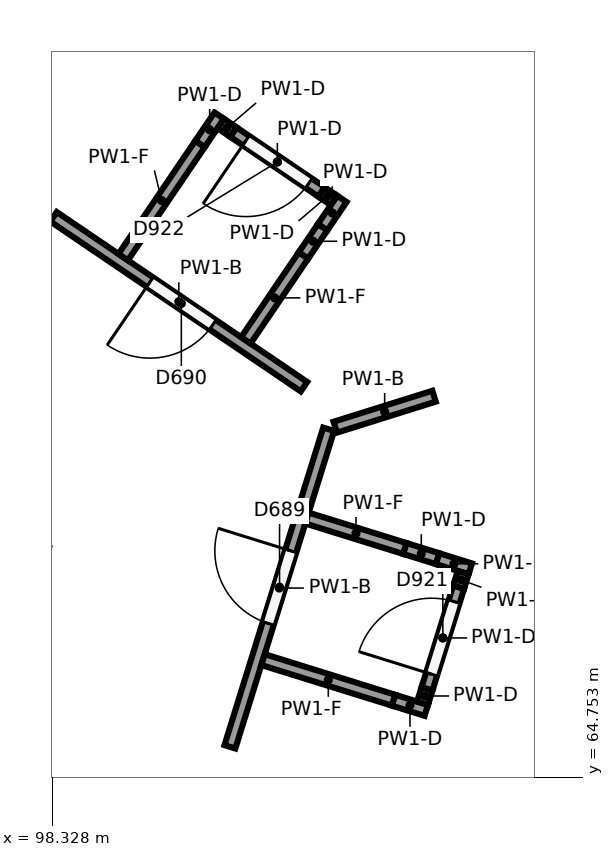
"""IFC4 building model, lengths in metres.
Left out: names, types, materials, properties, quantities, classifications, styles, units other than length and angle.
Written with IfcOpenShell. Run it as: python <this file> out.ifc"""

import sys

from ifc_helpers import new_model, si_unit, direction, frame, frame_2d, origin, origin_2d, place, context, subcontext, project, spatial, rectangle, circle, extrude, element, fill, save


model = new_model("IFC4")
c1 = context("Model", 3, precision=1e-05, world=origin(), true_north=direction((0.0, 1.0)))
c2 = subcontext(c1, "Body", "Model", "MODEL_VIEW")
j1 = project(units=[si_unit("LENGTHUNIT", "METRE"), si_unit("PLANEANGLEUNIT", "RADIAN")], contexts=[c1])
p1 = place(None, origin())
s1 = spatial("IfcSite", under=j1, at=p1, CompositionType="ELEMENT")
p2 = place(p1, origin())
s2 = spatial("IfcBuilding", under=s1, at=p2, CompositionType="ELEMENT")
p3 = place(p2, frame((0.0, 0.0, 6.5)))
s3 = spatial("IfcBuildingStorey", under=s2, at=p3, CompositionType="ELEMENT", Elevation=6.5)
p4 = place(p3, frame((98.291, 68.297, 0.0), z_axis=(0.0, 0.0, 1.0), x_axis=(1.0, 0.0, 0.0)))
e1 = element("IfcColumn", 1, at=p4, inside=s3, PredefinedType="COLUMN", context=c2, shape_type="SweptSolid", body=[
    extrude(circle(Radius=0.5, at=origin_2d()), origin(), (0.0, 0.0, 1.0), 5.5),
])
for number, where, z_axis, x_axis in (
    (2, (101.14, 69.294, 0.0), (0.0, 0.0, 1.0), (1.0, 0.0, 0.0)),
    (3, (103.99, 70.292, 0.0), (0.0, 0.0, 1.0), (1.0, 0.0, 0.0)),
):
    element("IfcColumn", number, at=place(p3, frame(where, z_axis=z_axis, x_axis=x_axis)), inside=s3, PredefinedType="COLUMN", context=c2, shape_type="SweptSolid", body=[
        extrude(circle(Radius=0.4, at=origin_2d()), origin(), (0.0, 0.0, 1.0), 5.5),
    ])
p5 = place(p3, frame((100.665, 65.154, 0.0), z_axis=(0.0, 0.0, 1.0), x_axis=(0.296860778356, 0.954920770679, 0.0)))
e4 = element("IfcWall", 4, at=p5, inside=s3, PredefinedType="PARTITIONING", context=c2, shape_type="SweptSolid", body=[
    extrude(rectangle(XDim=4.375, YDim=0.15, at=frame_2d((2.188, 0.0))), origin(), (0.0, 0.0, 1.0), 5.05),
])
p6 = place(p5, frame((1.7, 0.0, 0.0)))
e5 = element("IfcOpeningElement", 5, at=p6, cuts=e4, PredefinedType="OPENING", context=c2, shape_type="SweptSolid", body=[
    extrude(rectangle(XDim=1.0, YDim=2.1, at=frame_2d((0.5, 1.05))), frame((0.0, 0.085, 0.0), z_axis=(0.0, -1.0, 0.0), x_axis=(1.0, 0.0, 0.0)), (0.0, 0.0, 1.0), 0.17),
])
p7 = place(p3, frame((102.051, 69.36, 0.0), z_axis=(0.0, 0.0, 1.0), x_axis=(0.954243765566, 0.299029824395, 0.0)))
e6 = element("IfcWall", 6, at=p7, inside=s3, PredefinedType="PARTITIONING", context=c2, shape_type="SweptSolid", body=[
    extrude(rectangle(XDim=1.363, YDim=0.15, at=frame_2d((0.681, 0.0))), origin(), (0.0, 0.0, 1.0), 5.05),
])
p8 = place(p3, frame((101.639, 69.893, 0.0), z_axis=(0.0, 0.0, 1.0), x_axis=(-0.82747475675, 0.561502918017, 0.0)))
e7 = element("IfcWall", 7, at=p8, inside=s3, PredefinedType="PARTITIONING", context=c2, shape_type="SweptSolid", body=[
    extrude(rectangle(XDim=3.981, YDim=0.15, at=frame_2d((1.99, 0.0))), origin(), (0.0, 0.0, 1.0), 5.05),
])
p9 = place(p8, frame((1.45, 0.0, 0.0)))
e8 = element("IfcOpeningElement", 8, at=p9, cuts=e7, PredefinedType="OPENING", context=c2, shape_type="SweptSolid", body=[
    extrude(rectangle(XDim=1.0, YDim=2.1, at=frame_2d((0.5, 1.05))), frame((0.0, 0.085, 0.0), z_axis=(0.0, -1.0, 0.0), x_axis=(1.0, 0.0, 0.0)), (0.0, 0.0, 1.0), 0.17),
])
p10 = place(p3, frame((101.1, 66.302, 0.0), z_axis=(0.0, 0.0, 1.0), x_axis=(0.954903789402, -0.296915397017, 0.0)))
e9 = element("IfcWall", 9, at=p10, inside=s3, PredefinedType="PARTITIONING", context=c2, shape_type="SweptSolid", body=[
    extrude(rectangle(XDim=1.8, YDim=0.15, at=frame_2d((0.9, 0.0))), origin(), (0.0, 0.0, 1.0), 5.1),
])
p11 = place(p3, frame((102.819, 65.767, 0.0), z_axis=(0.0, 0.0, 1.0), x_axis=(0.954942240285, -0.296791707634, 0.0)))
e10 = element("IfcWall", 10, at=p11, inside=s3, PredefinedType="PARTITIONING", context=c2, shape_type="SweptSolid", body=[
    extrude(rectangle(XDim=0.45, YDim=0.15, at=frame_2d((0.225, 0.0))), origin(), (0.0, 0.0, 1.0), 3.85),
])
p12 = place(p3, frame((101.679, 68.164, 0.0), z_axis=(0.0, 0.0, 1.0), x_axis=(0.954942240285, -0.296791707634, 0.0)))
e11 = element("IfcWall", 11, at=p12, inside=s3, PredefinedType="PARTITIONING", context=c2, shape_type="SweptSolid", body=[
    extrude(rectangle(XDim=1.35, YDim=0.15, at=frame_2d((0.675, 0.0))), origin(), (0.0, 0.0, 1.0), 5.1),
])
p13 = place(p3, frame((102.968, 67.763, 0.0), z_axis=(0.0, 0.0, 1.0), x_axis=(0.954836267143, -0.297132467004, 0.0)))
e12 = element("IfcWall", 12, at=p13, inside=s3, PredefinedType="PARTITIONING", context=c2, shape_type="SweptSolid", body=[
    extrude(rectangle(XDim=0.45, YDim=0.15, at=frame_2d((0.225, 0.0))), origin(), (0.0, 0.0, 1.0), 3.85),
])
p14 = place(p3, frame((103.398, 67.629, 0.0), z_axis=(0.0, 0.0, 1.0), x_axis=(0.954942240285, -0.296791707634, 0.0)))
e13 = element("IfcWall", 13, at=p14, inside=s3, PredefinedType="PARTITIONING", context=c2, shape_type="SweptSolid", body=[
    extrude(rectangle(XDim=0.45, YDim=0.15, at=frame_2d((0.225, 0.0))), origin(), (0.0, 0.0, 1.0), 3.85),
])
p15 = place(p3, frame((103.199, 65.728, 0.0), z_axis=(0.0, 0.0, 1.0), x_axis=(0.296744885248, 0.95495679121, 0.0)))
e14 = element("IfcWall", 14, at=p15, inside=s3, PredefinedType="PARTITIONING", context=c2, shape_type="SweptSolid", body=[
    extrude(rectangle(XDim=0.2, YDim=0.15, at=frame_2d((0.1, 0.0))), origin(), (0.0, 0.0, 1.0), 3.85),
])
p16 = place(p3, frame((103.259, 65.919, 0.0), z_axis=(0.0, 0.0, 1.0), x_axis=(0.296964091659, 0.95488864705, 0.0)))
e15 = element("IfcWall", 15, at=p16, inside=s3, PredefinedType="PARTITIONING", context=c2, shape_type="SweptSolid", body=[
    extrude(rectangle(XDim=1.4, YDim=0.15, at=frame_2d((0.7, 0.0))), origin(), (0.0, 0.0, 1.0), 3.85),
])
p17 = place(p16, frame((0.2, 0.0, 0.0)))
e16 = element("IfcOpeningElement", 16, at=p17, cuts=e15, PredefinedType="OPENING", context=c2, shape_type="SweptSolid", body=[
    extrude(rectangle(XDim=1.0, YDim=2.1, at=frame_2d((0.5, 1.05))), frame((0.0, 0.085, 0.0), z_axis=(0.0, -1.0, 0.0), x_axis=(1.0, 0.0, 0.0)), (0.0, 0.0, 1.0), 0.17),
])
p18 = place(p3, frame((103.675, 67.256, 0.0), z_axis=(0.0, 0.0, 1.0), x_axis=(0.296744885248, 0.95495679121, 0.0)))
e17 = element("IfcWall", 17, at=p18, inside=s3, PredefinedType="PARTITIONING", context=c2, shape_type="SweptSolid", body=[
    extrude(rectangle(XDim=0.2, YDim=0.15, at=frame_2d((0.1, 0.0))), origin(), (0.0, 0.0, 1.0), 3.85),
])
p19 = place(p3, frame((100.875, 70.502, 0.0), z_axis=(0.0, 0.0, 1.0), x_axis=(0.561567757892, 0.827430754382, 0.0)))
e18 = element("IfcWall", 18, at=p19, inside=s3, PredefinedType="PARTITIONING", context=c2, shape_type="SweptSolid", body=[
    extrude(rectangle(XDim=1.35, YDim=0.15, at=frame_2d((0.675, 0.0))), origin(), (0.0, 0.0, 1.0), 5.1),
])
p20 = place(p3, frame((101.633, 71.619, 0.0), z_axis=(0.0, 0.0, 1.0), x_axis=(0.561315731762, 0.827601745574, 0.0)))
e19 = element("IfcWall", 19, at=p20, inside=s3, PredefinedType="PARTITIONING", context=c2, shape_type="SweptSolid", body=[
    extrude(rectangle(XDim=0.45, YDim=0.15, at=frame_2d((0.225, 0.0))), origin(), (0.0, 0.0, 1.0), 3.85),
])
p21 = place(p3, frame((101.885, 71.992, 0.0), z_axis=(0.0, 0.0, 1.0), x_axis=(0.561567757892, 0.827430754382, 0.0)))
e20 = element("IfcWall", 20, at=p21, inside=s3, PredefinedType="PARTITIONING", context=c2, shape_type="SweptSolid", body=[
    extrude(rectangle(XDim=0.45, YDim=0.15, at=frame_2d((0.225, 0.0))), origin(), (0.0, 0.0, 1.0), 3.85),
])
p22 = place(p3, frame((99.261, 71.597, 0.0), z_axis=(0.0, 0.0, 1.0), x_axis=(0.561504735028, 0.82747352377, 0.0)))
e21 = element("IfcWall", 21, at=p22, inside=s3, PredefinedType="PARTITIONING", context=c2, shape_type="SweptSolid", body=[
    extrude(rectangle(XDim=1.8, YDim=0.15, at=frame_2d((0.9, 0.0))), origin(), (0.0, 0.0, 1.0), 5.1),
])
p23 = place(p3, frame((100.272, 73.086, 0.0), z_axis=(0.0, 0.0, 1.0), x_axis=(0.561315731762, 0.827601745574, 0.0)))
e22 = element("IfcWall", 22, at=p23, inside=s3, PredefinedType="PARTITIONING", context=c2, shape_type="SweptSolid", body=[
    extrude(rectangle(XDim=0.45, YDim=0.15, at=frame_2d((0.225, 0.0))), origin(), (0.0, 0.0, 1.0), 3.85),
])
p24 = place(p3, frame((102.034, 72.344, 0.0), z_axis=(0.0, 0.0, 1.0), x_axis=(-0.827516278761, 0.561441723053, 0.0)))
e23 = element("IfcWall", 23, at=p24, inside=s3, PredefinedType="PARTITIONING", context=c2, shape_type="SweptSolid", body=[
    extrude(rectangle(XDim=0.2, YDim=0.15, at=frame_2d((0.1, 0.0))), origin(), (0.0, 0.0, 1.0), 3.85),
])
p25 = place(p3, frame((101.868, 72.456, 0.0), z_axis=(0.0, 0.0, 1.0), x_axis=(-0.827461305414, 0.56152274045, 0.0)))
e24 = element("IfcWall", 24, at=p25, inside=s3, PredefinedType="PARTITIONING", context=c2, shape_type="SweptSolid", body=[
    extrude(rectangle(XDim=1.4, YDim=0.15, at=frame_2d((0.7, 0.0))), origin(), (0.0, 0.0, 1.0), 3.85),
])
p26 = place(p25, frame((0.2, 0.0, 0.0)))
e25 = element("IfcOpeningElement", 25, at=p26, cuts=e24, PredefinedType="OPENING", context=c2, shape_type="SweptSolid", body=[
    extrude(rectangle(XDim=1.0, YDim=2.1, at=frame_2d((0.5, 1.05))), frame((0.0, 0.085, 0.0), z_axis=(0.0, -1.0, 0.0), x_axis=(1.0, 0.0, 0.0)), (0.0, 0.0, 1.0), 0.17),
])
p27 = place(p3, frame((100.71, 73.242, 0.0), z_axis=(0.0, 0.0, 1.0), x_axis=(-0.827516278761, 0.561441723053, 0.0)))
e26 = element("IfcWall", 26, at=p27, inside=s3, PredefinedType="PARTITIONING", context=c2, shape_type="SweptSolid", body=[
    extrude(rectangle(XDim=0.2, YDim=0.15, at=frame_2d((0.1, 0.0))), origin(), (0.0, 0.0, 1.0), 3.85),
])
p28 = place(p6, origin())
e27 = element("IfcDoor", 27, at=p28, inside=s3, OperationType="SINGLE_SWING_RIGHT", PredefinedType="DOOR", context=c2, shape_type="SweptSolid", body=[
    extrude(rectangle(XDim=1.0, YDim=2.1, at=frame_2d((0.5, 1.05))), frame((0.0, 0.025, 0.0), z_axis=(0.0, -1.0, 0.0), x_axis=(1.0, 0.0, 0.0)), (0.0, 0.0, 1.0), 0.05),
])
fill(e5, e27)
p29 = place(p9, origin())
e28 = element("IfcDoor", 28, at=p29, inside=s3, OperationType="SINGLE_SWING_RIGHT", PredefinedType="DOOR", context=c2, shape_type="SweptSolid", body=[
    extrude(rectangle(XDim=1.0, YDim=2.1, at=frame_2d((0.5, 1.05))), frame((0.0, 0.025, 0.0), z_axis=(0.0, -1.0, 0.0), x_axis=(1.0, 0.0, 0.0)), (0.0, 0.0, 1.0), 0.05),
])
fill(e8, e28)
p30 = place(p17, origin())
e29 = element("IfcDoor", 29, at=p30, inside=s3, OperationType="SINGLE_SWING_LEFT", PredefinedType="DOOR", context=c2, shape_type="SweptSolid", body=[
    extrude(rectangle(XDim=1.0, YDim=2.1, at=frame_2d((0.5, 1.05))), frame((0.0, 0.025, 0.0), z_axis=(0.0, -1.0, 0.0), x_axis=(1.0, 0.0, 0.0)), (0.0, 0.0, 1.0), 0.05),
])
fill(e16, e29)
p31 = place(p26, origin())
e30 = element("IfcDoor", 30, at=p31, inside=s3, OperationType="SINGLE_SWING_RIGHT", PredefinedType="DOOR", context=c2, shape_type="SweptSolid", body=[
    extrude(rectangle(XDim=1.0, YDim=2.1, at=frame_2d((0.5, 1.05))), frame((0.0, 0.025, 0.0), z_axis=(0.0, -1.0, 0.0), x_axis=(1.0, 0.0, 0.0)), (0.0, 0.0, 1.0), 0.05),
])
fill(e25, e30)
save(model, sys.argv[1])
